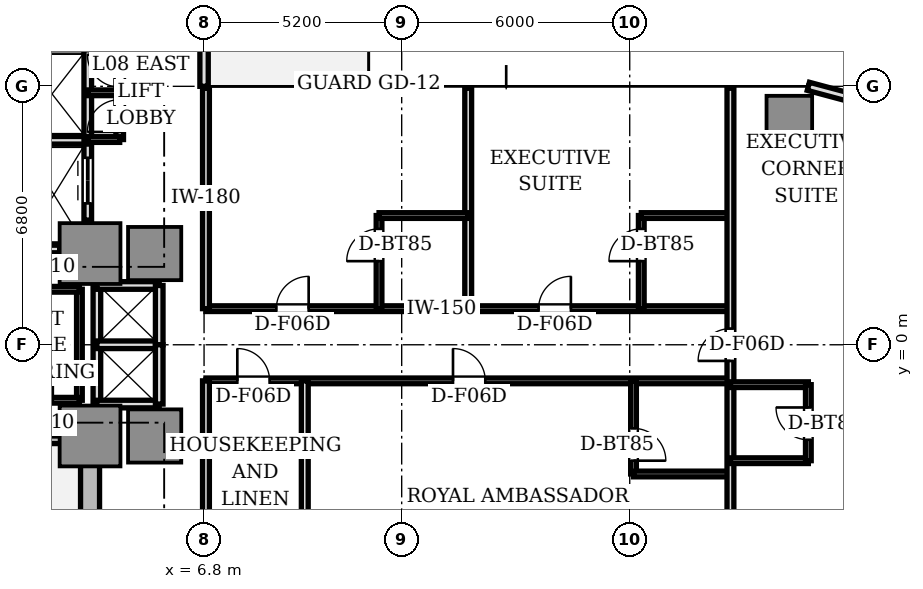
"""IFC4 building model, lengths in metres.
Left out: names, types, materials, properties, quantities, classifications, styles, units other than length and angle.
Written with IfcOpenShell. Run it as: python <this file> out.ifc"""

import sys

from ifc_helpers import new_model, si_unit, direction, frame, frame_2d, origin, origin_2d, place, context, subcontext, project, spatial, rectangle, extrude, source, transform, mapped, element, fill, save


model = new_model("IFC4")
c1 = context("Model", 3, precision=1e-05, world=origin(), true_north=direction((0.0, 1.0)))
c2 = subcontext(c1, "Body", "Model", "MODEL_VIEW")
j1 = project(units=[si_unit("LENGTHUNIT", "METRE"), si_unit("PLANEANGLEUNIT", "RADIAN")], contexts=[c1])
p1 = place(None, origin())
s1 = spatial("IfcSite", under=j1, at=p1, CompositionType="ELEMENT")
p2 = place(p1, origin())
s2 = spatial("IfcBuilding", under=s1, at=p2, CompositionType="ELEMENT")
p3 = place(p2, frame((0.0, 0.0, 33.15)))
s3 = spatial("IfcBuildingStorey", under=s2, at=p3, CompositionType="ELEMENT", Elevation=33.15)
p4 = place(p3, frame((3.8, -9.75, 0.0), z_axis=(0.0, 0.0, 1.0), x_axis=(0.0, 1.0, 0.0)))
e1 = element("IfcWall", 1, at=p4, inside=s3, PredefinedType="SHEAR", context=c2, shape_type="SweptSolid", body=[
    extrude(rectangle(XDim=6.9, YDim=0.5, at=frame_2d((3.45, 0.0))), origin(), (0.0, 0.0, 1.0), 3.11),
])
m1 = source(origin(), c2, "Body", "SweptSolid", [
    extrude(rectangle(XDim=1.6, YDim=1.6, at=origin_2d()), origin(), (0.0, 0.0, 1.0), 3.11),
])
for number, where, z_axis, x_axis in (
    (2, (3.8, 2.4, 0.0), (0.0, 0.0, 1.0), (1.0, 0.0, 0.0)),
    (3, (3.8, -2.4, 0.0), (0.0, 0.0, 1.0), (1.0, 0.0, 0.0)),
):
    element("IfcColumn", number, at=place(p3, frame(where, z_axis=z_axis, x_axis=x_axis)), inside=s3, PredefinedType="COLUMN", context=c2, shape_type="MappedRepresentation", body=[
        mapped(m1, transform((0.0, 0.0, 0.0), scale=1.0)),
    ])
m2 = source(origin(), c2, "Body", "SweptSolid", [
    extrude(rectangle(XDim=1.4, YDim=1.4, at=origin_2d()), origin(), (0.0, 0.0, 1.0), 3.11),
])
for number, where, z_axis, x_axis in (
    (4, (5.5, 2.4, 0.0), (0.0, 0.0, 1.0), (1.0, 0.0, 0.0)),
    (5, (5.5, -2.4, 0.0), (0.0, 0.0, 1.0), (1.0, 0.0, 0.0)),
):
    element("IfcColumn", number, at=place(p3, frame(where, z_axis=z_axis, x_axis=x_axis)), inside=s3, PredefinedType="COLUMN", context=c2, shape_type="MappedRepresentation", body=[
        mapped(m2, transform((0.0, 0.0, 0.0), scale=1.0)),
    ])
m3 = source(origin(), c2, "Body", "SweptSolid", [
    extrude(rectangle(XDim=1.2, YDim=1.2, at=origin_2d()), origin(), (0.0, 0.0, 1.0), 3.11),
])
p5 = place(p3, frame((22.2, 5.95, 0.0), z_axis=(0.0, 0.0, 1.0), x_axis=(1.0, 0.0, 0.0)))
e6 = element("IfcColumn", 6, at=p5, inside=s3, PredefinedType="COLUMN", context=c2, shape_type="MappedRepresentation", body=[
    mapped(m3, transform((0.0, 0.0, 0.0), scale=1.0)),
])
p6 = place(p3, frame((23.75, 6.519, 0.0), z_axis=(0.0, 0.0, 1.0), x_axis=(-0.965951058412, 0.25872485917, 0.0)))
e7 = element("IfcWall", 7, at=p6, inside=s3, PredefinedType="STANDARD", context=c2, shape_type="SweptSolid", body=[
    extrude(rectangle(XDim=1.087, YDim=0.22, at=frame_2d((0.543, 0.0))), origin(), (0.0, 0.0, 1.0), 3.11),
])
p7 = place(p3, frame((6.8, 6.8, 0.0), z_axis=(0.0, 0.0, 1.0), x_axis=(0.0, 1.0, 0.0)))
e8 = element("IfcWall", 8, at=p7, inside=s3, PredefinedType="STANDARD", context=c2, shape_type="SweptSolid", body=[
    extrude(rectangle(XDim=2.7, YDim=0.22, at=frame_2d((1.35, 0.0))), origin(), (0.0, 0.0, 1.0), 3.11),
])
p8 = place(p7, frame((1.4, 0.0, 0.0)))
e9 = element("IfcOpeningElement", 9, at=p8, cuts=e8, PredefinedType="OPENING", context=c2, shape_type="SweptSolid", body=[
    extrude(rectangle(XDim=1.0, YDim=2.2, at=frame_2d((0.5, 1.1))), frame((0.0, 0.12, 0.0), z_axis=(0.0, -1.0, 0.0), x_axis=(1.0, 0.0, 0.0)), (0.0, 0.0, 1.0), 0.24),
])
p9 = place(p3, frame((0.0, -2.5, 0.0), z_axis=(0.0, 0.0, 1.0), x_axis=(1.0, 0.0, 0.0)))
e10 = element("IfcWall", 10, at=p9, inside=s3, PredefinedType="SOLIDWALL", context=c2, shape_type="SweptSolid", body=[
    extrude(rectangle(XDim=3.72, YDim=0.2, at=frame_2d((1.86, 0.0))), origin(), (0.0, 0.0, 1.0), 3.11),
])
p10 = place(p3, frame((2.0, 2.52, 0.0), z_axis=(0.0, 0.0, 1.0), x_axis=(1.0, 0.0, 0.0)))
e11 = element("IfcWall", 11, at=p10, inside=s3, PredefinedType="SOLIDWALL", context=c2, shape_type="SweptSolid", body=[
    extrude(rectangle(XDim=1.0, YDim=0.2, at=frame_2d((0.5, 0.0))), origin(), (0.0, 0.0, 1.0), 2.66),
])
p11 = place(p3, frame((3.74, 3.28, 0.0), z_axis=(0.0, 0.0, 1.0), x_axis=(0.0, 1.0, 0.0)))
e12 = element("IfcWall", 12, at=p11, inside=s3, PredefinedType="SOLIDWALL", context=c2, shape_type="SweptSolid", body=[
    extrude(rectangle(XDim=2.08, YDim=0.2, at=frame_2d((1.04, 0.0))), origin(), (0.0, 0.0, 1.0), 2.66),
])
p12 = place(p11, frame((0.44, 0.0, 0.0)))
e13 = element("IfcOpeningElement", 13, at=p12, cuts=e12, PredefinedType="OPENING", context=c2, shape_type="SweptSolid", body=[
    extrude(rectangle(XDim=1.2, YDim=2.2, at=frame_2d((0.6, 1.1))), frame((0.0, 0.11, 0.0), z_axis=(0.0, -1.0, 0.0), x_axis=(1.0, 0.0, 0.0)), (0.0, 0.0, 1.0), 0.22),
])
p13 = place(p3, frame((0.05, 5.38, 0.0), z_axis=(0.0, 0.0, 1.0), x_axis=(1.0, 0.0, 0.0)))
e14 = element("IfcWall", 14, at=p13, inside=s3, PredefinedType="SOLIDWALL", context=c2, shape_type="SweptSolid", body=[
    extrude(rectangle(XDim=3.69, YDim=0.2, at=frame_2d((1.845, 0.0))), origin(), (0.0, 0.0, 1.0), 2.66),
])
p14 = place(p3, frame((3.74, 5.38, 0.0), z_axis=(0.0, 0.0, 1.0), x_axis=(0.0, 1.0, 0.0)))
e15 = element("IfcWall", 15, at=p14, inside=s3, PredefinedType="SOLIDWALL", context=c2, shape_type="SweptSolid", body=[
    extrude(rectangle(XDim=2.48, YDim=0.2, at=frame_2d((1.24, 0.0))), origin(), (0.0, 0.0, 1.0), 2.66),
])
p15 = place(p3, frame((3.98, -1.56, 0.0), z_axis=(0.0, 0.0, 1.0), x_axis=(0.0, 1.0, 0.0)))
e16 = element("IfcWall", 16, at=p15, inside=s3, PredefinedType="SOLIDWALL", context=c2, shape_type="SweptSolid", body=[
    extrude(rectangle(XDim=3.12, YDim=0.2, at=frame_2d((1.56, 0.0))), origin(), (0.0, 0.0, 1.0), 2.18),
])
for number, where, z_axis, x_axis in (
    (17, (3.98, 1.56, 0.0), (0.0, 0.0, 1.0), (1.0, 0.0, 0.0)),
    (18, (3.98, -1.56, 0.0), (0.0, 0.0, 1.0), (1.0, 0.0, 0.0)),
    (19, (3.98, 0.0, 0.0), (0.0, 0.0, 1.0), (1.0, 0.0, 0.0)),
):
    element("IfcWall", number, at=place(p3, frame(where, z_axis=z_axis, x_axis=x_axis)), inside=s3, PredefinedType="SOLIDWALL", context=c2, shape_type="SweptSolid", body=[
        extrude(rectangle(XDim=1.64, YDim=0.2, at=frame_2d((0.82, 0.0))), origin(), (0.0, 0.0, 1.0), 2.66),
    ])
for number, where, z_axis, x_axis in (
    (20, (5.62, 0.0, 0.0), (0.0, 0.0, 1.0), (0.0, 1.0, 0.0)),
    (21, (5.62, -1.56, 0.0), (0.0, 0.0, 1.0), (0.0, 1.0, 0.0)),
):
    element("IfcWall", number, at=place(p3, frame(where, z_axis=z_axis, x_axis=x_axis)), inside=s3, PredefinedType="SOLIDWALL", context=c2, shape_type="SweptSolid", body=[
        extrude(rectangle(XDim=1.56, YDim=0.2, at=frame_2d((0.78, 0.0))), origin(), (0.0, 0.0, 1.0), 2.66),
    ])
p16 = place(p3, frame((4.58, 5.4, 0.0), z_axis=(0.0, 0.0, 1.0), x_axis=(0.0, 1.0, 0.0)))
e22 = element("IfcWall", 22, at=p16, inside=s3, PredefinedType="SOLIDWALL", context=c2, shape_type="SweptSolid", body=[
    extrude(rectangle(XDim=2.46, YDim=0.2, at=frame_2d((1.23, 0.0))), origin(), (0.0, 0.0, 1.0), 2.66),
])
p17 = place(p16, frame((0.2, 0.0, 0.0)))
e23 = element("IfcOpeningElement", 23, at=p17, cuts=e22, PredefinedType="OPENING", context=c2, shape_type="SweptSolid", body=[
    extrude(rectangle(XDim=0.85, YDim=2.1, at=frame_2d((0.425, 1.05))), frame((0.0, 0.11, 0.0), z_axis=(0.0, -1.0, 0.0), x_axis=(1.0, 0.0, 0.0)), (0.0, 0.0, 1.0), 0.22),
])
p18 = place(p16, frame((1.38, 0.0, 0.0)))
e24 = element("IfcOpeningElement", 24, at=p18, cuts=e22, PredefinedType="OPENING", context=c2, shape_type="SweptSolid", body=[
    extrude(rectangle(XDim=0.85, YDim=2.1, at=frame_2d((0.425, 1.05))), frame((0.0, 0.11, 0.0), z_axis=(0.0, -1.0, 0.0), x_axis=(1.0, 0.0, 0.0)), (0.0, 0.0, 1.0), 0.22),
])
for number, where, z_axis, x_axis in (
    (25, (3.74, 5.4, 0.0), (0.0, 0.0, 1.0), (1.0, 0.0, 0.0)),
    (26, (3.74, 6.63, 0.0), (0.0, 0.0, 1.0), (1.0, 0.0, 0.0)),
):
    element("IfcWall", number, at=place(p3, frame(where, z_axis=z_axis, x_axis=x_axis)), inside=s3, PredefinedType="PARTITIONING", context=c2, shape_type="SweptSolid", body=[
        extrude(rectangle(XDim=0.84, YDim=0.15, at=frame_2d((0.42, 0.0))), origin(), (0.0, 0.0, 1.0), 2.66),
    ])
p19 = place(p3, frame((3.52, -1.46, 0.0), z_axis=(0.0, 0.0, 1.0), x_axis=(0.0, 1.0, 0.0)))
e27 = element("IfcWall", 27, at=p19, inside=s3, PredefinedType="PARTITIONING", context=c2, shape_type="SweptSolid", body=[
    extrude(rectangle(XDim=2.92, YDim=0.15, at=frame_2d((1.46, 0.0))), origin(), (0.0, 0.0, 1.0), 2.18),
])
p20 = place(p3, frame((1.32, 1.46, 0.0), z_axis=(0.0, 0.0, 1.0), x_axis=(1.0, 0.0, 0.0)))
e28 = element("IfcWall", 28, at=p20, inside=s3, PredefinedType="PARTITIONING", context=c2, shape_type="SweptSolid", body=[
    extrude(rectangle(XDim=2.2, YDim=0.15, at=frame_2d((1.1, 0.0))), origin(), (0.0, 0.0, 1.0), 2.66),
])
p21 = place(p3, frame((1.32, -1.46, 0.0), z_axis=(0.0, 0.0, 1.0), x_axis=(1.0, 0.0, 0.0)))
e29 = element("IfcWall", 29, at=p21, inside=s3, PredefinedType="PARTITIONING", context=c2, shape_type="SweptSolid", body=[
    extrude(rectangle(XDim=2.2, YDim=0.15, at=frame_2d((1.1, 0.0))), origin(), (0.0, 0.0, 1.0), 2.66),
])
p22 = place(p21, frame((0.65, 0.0, 0.0)))
e30 = element("IfcOpeningElement", 30, at=p22, cuts=e29, PredefinedType="OPENING", context=c2, shape_type="SweptSolid", body=[
    extrude(rectangle(XDim=0.85, YDim=2.1, at=frame_2d((0.425, 1.05))), frame((0.0, 0.085, 0.0), z_axis=(0.0, -1.0, 0.0), x_axis=(1.0, 0.0, 0.0)), (0.0, 0.0, 1.0), 0.17),
])
p23 = place(p3, frame((6.85, 0.95, 0.0), z_axis=(0.0, 0.0, 1.0), x_axis=(1.0, 0.0, 0.0)))
e31 = element("IfcWall", 31, at=p23, inside=s3, PredefinedType="PARTITIONING", context=c2, shape_type="SweptSolid", body=[
    extrude(rectangle(XDim=13.8, YDim=0.15, at=frame_2d((6.9, 0.0))), origin(), (0.0, 0.0, 1.0), 2.66),
])
p24 = place(p23, frame((1.852, 0.0, 0.0)))
e32 = element("IfcOpeningElement", 32, at=p24, cuts=e31, PredefinedType="OPENING", context=c2, shape_type="SweptSolid", body=[
    extrude(rectangle(XDim=0.85, YDim=2.1, at=frame_2d((0.425, 1.05))), frame((0.0, 0.085, 0.0), z_axis=(0.0, -1.0, 0.0), x_axis=(1.0, 0.0, 0.0)), (0.0, 0.0, 1.0), 0.17),
])
p25 = place(p23, frame((8.752, 0.0, 0.0)))
e33 = element("IfcOpeningElement", 33, at=p25, cuts=e31, PredefinedType="OPENING", context=c2, shape_type="SweptSolid", body=[
    extrude(rectangle(XDim=0.85, YDim=2.1, at=frame_2d((0.425, 1.05))), frame((0.0, 0.085, 0.0), z_axis=(0.0, -1.0, 0.0), x_axis=(1.0, 0.0, 0.0)), (0.0, 0.0, 1.0), 0.17),
])
p26 = place(p3, frame((6.85, -0.95, 0.0), z_axis=(0.0, 0.0, 1.0), x_axis=(1.0, 0.0, 0.0)))
e34 = element("IfcWall", 34, at=p26, inside=s3, PredefinedType="PARTITIONING", context=c2, shape_type="SweptSolid", body=[
    extrude(rectangle(XDim=13.8, YDim=0.15, at=frame_2d((6.9, 0.0))), origin(), (0.0, 0.0, 1.0), 2.66),
])
p27 = place(p26, frame((0.825, 0.0, 0.0)))
e35 = element("IfcOpeningElement", 35, at=p27, cuts=e34, PredefinedType="OPENING", context=c2, shape_type="SweptSolid", body=[
    extrude(rectangle(XDim=0.85, YDim=2.1, at=frame_2d((0.425, 1.05))), frame((0.0, 0.085, 0.0), z_axis=(0.0, -1.0, 0.0), x_axis=(1.0, 0.0, 0.0)), (0.0, 0.0, 1.0), 0.17),
])
p28 = place(p26, frame((6.5, 0.0, 0.0)))
e36 = element("IfcOpeningElement", 36, at=p28, cuts=e34, PredefinedType="OPENING", context=c2, shape_type="SweptSolid", body=[
    extrude(rectangle(XDim=0.85, YDim=2.1, at=frame_2d((0.425, 1.05))), frame((0.0, 0.085, 0.0), z_axis=(0.0, -1.0, 0.0), x_axis=(1.0, 0.0, 0.0)), (0.0, 0.0, 1.0), 0.17),
])
for number, where, z_axis, x_axis in (
    (37, (6.85, 0.95, 0.0), (0.0, 0.0, 1.0), (0.0, 1.0, 0.0)),
    (38, (6.85, -6.75, 0.0), (0.0, 0.0, 1.0), (0.0, 1.0, 0.0)),
    (39, (13.75, 0.95, 0.0), (0.0, 0.0, 1.0), (0.0, 1.0, 0.0)),
):
    element("IfcWall", number, at=place(p3, frame(where, z_axis=z_axis, x_axis=x_axis)), inside=s3, PredefinedType="PARTITIONING", context=c2, shape_type="SweptSolid", body=[
        extrude(rectangle(XDim=5.8, YDim=0.18, at=frame_2d((2.9, 0.0))), origin(), (0.0, 0.0, 1.0), 2.66),
    ])
p29 = place(p3, frame((11.404, 0.95, 0.0), z_axis=(0.0, 0.0, 1.0), x_axis=(0.0, 1.0, 0.0)))
e40 = element("IfcWall", 40, at=p29, inside=s3, PredefinedType="PARTITIONING", context=c2, shape_type="SweptSolid", body=[
    extrude(rectangle(XDim=2.45, YDim=0.15, at=frame_2d((1.225, 0.0))), origin(), (0.0, 0.0, 1.0), 2.66),
])
p30 = place(p29, frame((1.25, 0.0, 0.0)))
e41 = element("IfcOpeningElement", 41, at=p30, cuts=e40, PredefinedType="OPENING", context=c2, shape_type="SweptSolid", body=[
    extrude(rectangle(XDim=0.85, YDim=2.1, at=frame_2d((0.425, 1.05))), frame((0.0, 0.085, 0.0), z_axis=(0.0, -1.0, 0.0), x_axis=(1.0, 0.0, 0.0)), (0.0, 0.0, 1.0), 0.17),
])
p31 = place(p3, frame((11.404, 3.4, 0.0), z_axis=(0.0, 0.0, 1.0), x_axis=(1.0, 0.0, 0.0)))
e42 = element("IfcWall", 42, at=p31, inside=s3, PredefinedType="PARTITIONING", context=c2, shape_type="SweptSolid", body=[
    extrude(rectangle(XDim=2.346, YDim=0.15, at=frame_2d((1.173, 0.0))), origin(), (0.0, 0.0, 1.0), 2.63),
])
p32 = place(p3, frame((18.304, 0.95, 0.0), z_axis=(0.0, 0.0, 1.0), x_axis=(0.0, 1.0, 0.0)))
e43 = element("IfcWall", 43, at=p32, inside=s3, PredefinedType="PARTITIONING", context=c2, shape_type="SweptSolid", body=[
    extrude(rectangle(XDim=2.45, YDim=0.15, at=frame_2d((1.225, 0.0))), origin(), (0.0, 0.0, 1.0), 2.66),
])
p33 = place(p32, frame((1.25, 0.0, 0.0)))
e44 = element("IfcOpeningElement", 44, at=p33, cuts=e43, PredefinedType="OPENING", context=c2, shape_type="SweptSolid", body=[
    extrude(rectangle(XDim=0.85, YDim=2.1, at=frame_2d((0.425, 1.05))), frame((0.0, 0.085, 0.0), z_axis=(0.0, -1.0, 0.0), x_axis=(1.0, 0.0, 0.0)), (0.0, 0.0, 1.0), 0.17),
])
p34 = place(p3, frame((18.304, 3.4, 0.0), z_axis=(0.0, 0.0, 1.0), x_axis=(1.0, 0.0, 0.0)))
e45 = element("IfcWall", 45, at=p34, inside=s3, PredefinedType="PARTITIONING", context=c2, shape_type="SweptSolid", body=[
    extrude(rectangle(XDim=2.346, YDim=0.15, at=frame_2d((1.173, 0.0))), origin(), (0.0, 0.0, 1.0), 2.63),
])
p35 = place(p3, frame((9.45, -0.95, 0.0), z_axis=(0.0, 0.0, 1.0), x_axis=(0.0, -1.0, 0.0)))
e46 = element("IfcWall", 46, at=p35, inside=s3, PredefinedType="PARTITIONING", context=c2, shape_type="SweptSolid", body=[
    extrude(rectangle(XDim=5.8, YDim=0.18, at=frame_2d((2.9, 0.0))), origin(), (0.0, 0.0, 1.0), 2.66),
])
p36 = place(p3, frame((18.1, -0.95, 0.0), z_axis=(0.0, 0.0, 1.0), x_axis=(0.0, -1.0, 0.0)))
e47 = element("IfcWall", 47, at=p36, inside=s3, PredefinedType="PARTITIONING", context=c2, shape_type="SweptSolid", body=[
    extrude(rectangle(XDim=2.45, YDim=0.15, at=frame_2d((1.225, 0.0))), origin(), (0.0, 0.0, 1.0), 2.66),
])
p37 = place(p36, frame((1.25, 0.0, 0.0)))
e48 = element("IfcOpeningElement", 48, at=p37, cuts=e47, PredefinedType="OPENING", context=c2, shape_type="SweptSolid", body=[
    extrude(rectangle(XDim=0.85, YDim=2.1, at=frame_2d((0.425, 1.05))), frame((0.0, 0.085, 0.0), z_axis=(0.0, -1.0, 0.0), x_axis=(1.0, 0.0, 0.0)), (0.0, 0.0, 1.0), 0.17),
])
p38 = place(p3, frame((18.1, -3.4, 0.0), z_axis=(0.0, 0.0, 1.0), x_axis=(1.0, 0.0, 0.0)))
e49 = element("IfcWall", 49, at=p38, inside=s3, PredefinedType="PARTITIONING", context=c2, shape_type="SweptSolid", body=[
    extrude(rectangle(XDim=2.55, YDim=0.15, at=frame_2d((1.275, 0.0))), origin(), (0.0, 0.0, 1.0), 2.63),
])
p39 = place(p3, frame((20.65, -6.75, 0.0), z_axis=(0.0, 0.0, 1.0), x_axis=(0.0, 1.0, 0.0)))
e50 = element("IfcWall", 50, at=p39, inside=s3, PredefinedType="PARTITIONING", context=c2, shape_type="SweptSolid", body=[
    extrude(rectangle(XDim=13.5, YDim=0.18, at=frame_2d((6.75, 0.0))), origin(), (0.0, 0.0, 1.0), 2.66),
])
p40 = place(p39, frame((6.325, 0.0, 0.0)))
e51 = element("IfcOpeningElement", 51, at=p40, cuts=e50, PredefinedType="OPENING", context=c2, shape_type="SweptSolid", body=[
    extrude(rectangle(XDim=0.85, YDim=2.1, at=frame_2d((0.425, 1.05))), frame((0.0, 0.1, 0.0), z_axis=(0.0, -1.0, 0.0), x_axis=(1.0, 0.0, 0.0)), (0.0, 0.0, 1.0), 0.2),
])
p41 = place(p3, frame((20.65, -1.05, 0.0), z_axis=(0.0, 0.0, 1.0), x_axis=(1.0, 0.0, 0.0)))
e52 = element("IfcWall", 52, at=p41, inside=s3, PredefinedType="PARTITIONING", context=c2, shape_type="SweptSolid", body=[
    extrude(rectangle(XDim=2.05, YDim=0.15, at=frame_2d((1.025, 0.0))), origin(), (0.0, 0.0, 1.0), 2.66),
])
p42 = place(p3, frame((20.65, -3.05, 0.0), z_axis=(0.0, 0.0, 1.0), x_axis=(1.0, 0.0, 0.0)))
e53 = element("IfcWall", 53, at=p42, inside=s3, PredefinedType="PARTITIONING", context=c2, shape_type="SweptSolid", body=[
    extrude(rectangle(XDim=2.05, YDim=0.15, at=frame_2d((1.025, 0.0))), origin(), (0.0, 0.0, 1.0), 2.63),
])
p43 = place(p3, frame((22.7, -3.05, 0.0), z_axis=(0.0, 0.0, 1.0), x_axis=(0.0, 1.0, 0.0)))
e54 = element("IfcWall", 54, at=p43, inside=s3, PredefinedType="PARTITIONING", context=c2, shape_type="SweptSolid", body=[
    extrude(rectangle(XDim=2.0, YDim=0.15, at=frame_2d((1.0, 0.0))), origin(), (0.0, 0.0, 1.0), 2.66),
])
p44 = place(p43, frame((0.55, 0.0, 0.0)))
e55 = element("IfcOpeningElement", 55, at=p44, cuts=e54, PredefinedType="OPENING", context=c2, shape_type="SweptSolid", body=[
    extrude(rectangle(XDim=0.85, YDim=2.1, at=frame_2d((0.425, 1.05))), frame((0.0, 0.085, 0.0), z_axis=(0.0, -1.0, 0.0), x_axis=(1.0, 0.0, 0.0)), (0.0, 0.0, 1.0), 0.17),
])
m4 = source(origin(), c2, "Body", "SweptSolid", [
    extrude(rectangle(XDim=1.2, YDim=0.05, at=origin_2d()), origin(), (0.0, 0.0, 1.0), 2.2),
])
p45 = place(p12, frame((0.6, 0.0, 0.0)))
e56 = element("IfcDoor", 56, at=p45, inside=s3, OperationType="DOUBLE_DOOR_SLIDING", PredefinedType="DOOR", context=c2, shape_type="MappedRepresentation", body=[
    mapped(m4, transform((0.0, 0.0, 0.0), scale=1.0)),
])
fill(e13, e56)
m5 = source(origin(), c2, "Body", "SweptSolid", [
    extrude(rectangle(XDim=0.85, YDim=0.05, at=origin_2d()), origin(), (0.0, 0.0, 1.0), 2.1),
])
p46 = place(p17, frame((0.425, 0.0, 0.0)))
e57 = element("IfcDoor", 57, at=p46, inside=s3, OperationType="SINGLE_SWING_LEFT", PredefinedType="DOOR", context=c2, shape_type="MappedRepresentation", body=[
    mapped(m5, transform((0.0, 0.0, 0.0), scale=1.0)),
])
fill(e23, e57)
p47 = place(p18, frame((0.425, 0.0, 0.0)))
e58 = element("IfcDoor", 58, at=p47, inside=s3, OperationType="SINGLE_SWING_RIGHT", PredefinedType="DOOR", context=c2, shape_type="MappedRepresentation", body=[
    mapped(m5, transform((0.0, 0.0, 0.0), scale=1.0)),
])
fill(e24, e58)
p48 = place(p30, frame((0.425, 0.0, 0.0)))
e59 = element("IfcDoor", 59, at=p48, inside=s3, OperationType="SINGLE_SWING_LEFT", PredefinedType="DOOR", context=c2, shape_type="MappedRepresentation", body=[
    mapped(m5, transform((0.0, 0.0, 0.0), scale=1.0)),
])
fill(e41, e59)
p49 = place(p24, frame((0.425, 0.0, 0.0)))
e60 = element("IfcDoor", 60, at=p49, inside=s3, OperationType="SINGLE_SWING_RIGHT", PredefinedType="DOOR", context=c2, shape_type="MappedRepresentation", body=[
    mapped(m5, transform((0.0, 0.0, 0.0), scale=1.0)),
])
fill(e32, e60)
p50 = place(p33, frame((0.425, 0.0, 0.0)))
e61 = element("IfcDoor", 61, at=p50, inside=s3, OperationType="SINGLE_SWING_LEFT", PredefinedType="DOOR", context=c2, shape_type="MappedRepresentation", body=[
    mapped(m5, transform((0.0, 0.0, 0.0), scale=1.0)),
])
fill(e44, e61)
p51 = place(p25, frame((0.425, 0.0, 0.0)))
e62 = element("IfcDoor", 62, at=p51, inside=s3, OperationType="SINGLE_SWING_RIGHT", PredefinedType="DOOR", context=c2, shape_type="MappedRepresentation", body=[
    mapped(m5, transform((0.0, 0.0, 0.0), scale=1.0)),
])
fill(e33, e62)
p52 = place(p27, frame((0.425, 0.0, 0.0)))
e63 = element("IfcDoor", 63, at=p52, inside=s3, OperationType="SINGLE_SWING_LEFT", PredefinedType="DOOR", context=c2, shape_type="MappedRepresentation", body=[
    mapped(m5, transform((0.0, 0.0, 0.0), scale=1.0)),
])
fill(e35, e63)
p53 = place(p37, frame((0.425, 0.0, 0.0)))
e64 = element("IfcDoor", 64, at=p53, inside=s3, OperationType="SINGLE_SWING_RIGHT", PredefinedType="DOOR", context=c2, shape_type="MappedRepresentation", body=[
    mapped(m5, transform((0.0, 0.0, 0.0), scale=1.0)),
])
fill(e48, e64)
p54 = place(p28, frame((0.425, 0.0, 0.0)))
e65 = element("IfcDoor", 65, at=p54, inside=s3, OperationType="SINGLE_SWING_LEFT", PredefinedType="DOOR", context=c2, shape_type="MappedRepresentation", body=[
    mapped(m5, transform((0.0, 0.0, 0.0), scale=1.0)),
])
fill(e36, e65)
p55 = place(p44, frame((0.425, 0.0, 0.0)))
e66 = element("IfcDoor", 66, at=p55, inside=s3, OperationType="SINGLE_SWING_RIGHT", PredefinedType="DOOR", context=c2, shape_type="MappedRepresentation", body=[
    mapped(m5, transform((0.0, 0.0, 0.0), scale=1.0)),
])
fill(e55, e66)
p56 = place(p40, frame((0.425, 0.0, 0.0)))
e67 = element("IfcDoor", 67, at=p56, inside=s3, OperationType="SINGLE_SWING_LEFT", PredefinedType="DOOR", context=c2, shape_type="MappedRepresentation", body=[
    mapped(m5, transform((0.0, 0.0, 0.0), scale=1.0)),
])
fill(e51, e67)
save(model, sys.argv[1])
